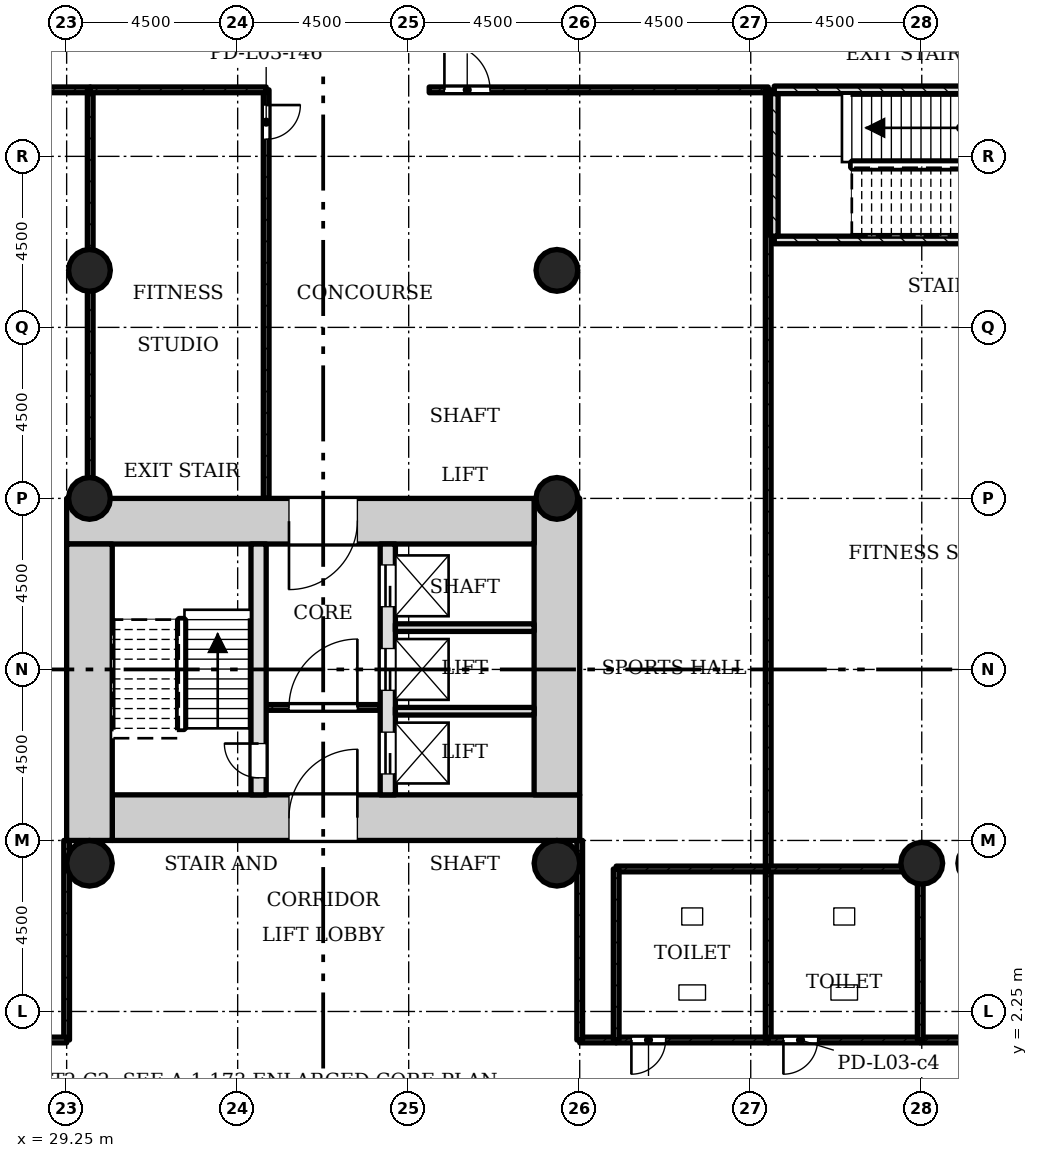
"""IFC4 building model, lengths in metres.
Left out: names, types, materials, properties, quantities, classifications, styles, units other than length and angle.
Written with IfcOpenShell. Run it as: python <this file> out.ifc"""

import sys

from ifc_helpers import new_model, si_unit, direction, frame, frame_2d, origin, origin_2d, place, context, subcontext, project, spatial, rectangle, hollow_circle, extrude, element, fill, save


model = new_model("IFC4")
c1 = context("Model", 3, precision=1e-05, world=origin(), true_north=direction((0.0, 1.0)))
c2 = subcontext(c1, "Body", "Model", "MODEL_VIEW")
j1 = project(units=[si_unit("LENGTHUNIT", "METRE"), si_unit("PLANEANGLEUNIT", "RADIAN")], contexts=[c1])
p1 = place(None, origin())
s1 = spatial("IfcSite", under=j1, at=p1, CompositionType="ELEMENT")
p2 = place(p1, origin())
s2 = spatial("IfcBuilding", under=s1, at=p2, CompositionType="ELEMENT")
p3 = place(p2, frame((0.0, 0.0, 15.5)))
s3 = spatial("IfcBuildingStorey", under=s2, at=p3, CompositionType="ELEMENT", Elevation=15.5)
p4 = place(p3, frame((30.45, 7.35, 0.0), z_axis=(0.0, 0.0, 1.0), x_axis=(1.0, 0.0, 0.0)))
e1 = element("IfcWall", 1, at=p4, inside=s3, PredefinedType="SHEAR", context=c2, shape_type="SweptSolid", body=[
    extrude(rectangle(XDim=12.3, YDim=1.2, at=frame_2d((6.15, 0.0))), origin(), (0.0, 0.0, 1.0), 4.5),
])
p5 = place(p4, frame((4.65, 0.0, 0.0)))
e2 = element("IfcOpeningElement", 2, at=p5, cuts=e1, PredefinedType="OPENING", context=c2, shape_type="SweptSolid", body=[
    extrude(rectangle(XDim=1.8, YDim=2.1, at=frame_2d((0.9, 1.05))), frame((0.0, 0.61, 0.0), z_axis=(0.0, -1.0, 0.0), x_axis=(1.0, 0.0, 0.0)), (0.0, 0.0, 1.0), 1.22),
])
p6 = place(p3, frame((42.15, 7.95, 0.0), z_axis=(0.0, 0.0, 1.0), x_axis=(0.0, 1.0, 0.0)))
e3 = element("IfcWall", 3, at=p6, inside=s3, PredefinedType="SHEAR", context=c2, shape_type="SweptSolid", body=[
    extrude(rectangle(XDim=7.8, YDim=1.2, at=frame_2d((3.9, 0.0))), origin(), (0.0, 0.0, 1.0), 4.5),
])
p7 = place(p3, frame((41.55, 15.15, 0.0), z_axis=(0.0, 0.0, 1.0), x_axis=(-1.0, 0.0, 0.0)))
e4 = element("IfcWall", 4, at=p7, inside=s3, PredefinedType="SHEAR", context=c2, shape_type="SweptSolid", body=[
    extrude(rectangle(XDim=12.3, YDim=1.2, at=frame_2d((6.15, 0.0))), origin(), (0.0, 0.0, 1.0), 4.5),
])
p8 = place(p7, frame((4.65, 0.0, 0.0)))
e5 = element("IfcOpeningElement", 5, at=p8, cuts=e4, PredefinedType="OPENING", context=c2, shape_type="SweptSolid", body=[
    extrude(rectangle(XDim=1.8, YDim=2.1, at=frame_2d((0.9, 1.05))), frame((0.0, 0.61, 0.0), z_axis=(0.0, -1.0, 0.0), x_axis=(1.0, 0.0, 0.0)), (0.0, 0.0, 1.0), 1.22),
])
p9 = place(p3, frame((29.85, 14.55, 0.0), z_axis=(0.0, 0.0, 1.0), x_axis=(0.0, -1.0, 0.0)))
e6 = element("IfcWall", 6, at=p9, inside=s3, PredefinedType="SHEAR", context=c2, shape_type="SweptSolid", body=[
    extrude(rectangle(XDim=7.8, YDim=1.2, at=frame_2d((3.9, 0.0))), origin(), (0.0, 0.0, 1.0), 4.5),
])
p10 = place(p3, frame((34.3, 7.95, 0.0), z_axis=(0.0, 0.0, 1.0), x_axis=(0.0, 1.0, 0.0)))
e7 = element("IfcWall", 7, at=p10, inside=s3, PredefinedType="SHEAR", context=c2, shape_type="SweptSolid", body=[
    extrude(rectangle(XDim=6.6, YDim=0.4, at=frame_2d((3.3, 0.0))), origin(), (0.0, 0.0, 1.0), 4.5),
])
p11 = place(p10, frame((0.45, 0.0, 0.0)))
e8 = element("IfcOpeningElement", 8, at=p11, cuts=e7, PredefinedType="OPENING", context=c2, shape_type="SweptSolid", body=[
    extrude(rectangle(XDim=0.9, YDim=2.1, at=frame_2d((0.45, 1.05))), frame((0.0, 0.21, 0.0), z_axis=(0.0, -1.0, 0.0), x_axis=(1.0, 0.0, 0.0)), (0.0, 0.0, 1.0), 0.42),
])
p12 = place(p3, frame((37.7, 7.95, 0.0), z_axis=(0.0, 0.0, 1.0), x_axis=(0.0, 1.0, 0.0)))
e9 = element("IfcWall", 9, at=p12, inside=s3, PredefinedType="SHEAR", context=c2, shape_type="SweptSolid", body=[
    extrude(rectangle(XDim=6.6, YDim=0.4, at=frame_2d((3.3, 0.0))), origin(), (0.0, 0.0, 1.0), 4.5),
])
p13 = place(p12, frame((0.55, 0.0, 0.0)))
e10 = element("IfcOpeningElement", 10, at=p13, cuts=e9, PredefinedType="OPENING", context=c2, shape_type="SweptSolid", body=[
    extrude(rectangle(XDim=1.1, YDim=2.1, at=frame_2d((0.55, 1.05))), frame((0.0, 0.21, 0.0), z_axis=(0.0, -1.0, 0.0), x_axis=(1.0, 0.0, 0.0)), (0.0, 0.0, 1.0), 0.42),
])
p14 = place(p12, frame((2.75, 0.0, 0.0)))
e11 = element("IfcOpeningElement", 11, at=p14, cuts=e9, PredefinedType="OPENING", context=c2, shape_type="SweptSolid", body=[
    extrude(rectangle(XDim=1.1, YDim=2.1, at=frame_2d((0.55, 1.05))), frame((0.0, 0.21, 0.0), z_axis=(0.0, -1.0, 0.0), x_axis=(1.0, 0.0, 0.0)), (0.0, 0.0, 1.0), 0.42),
])
p15 = place(p12, frame((4.95, 0.0, 0.0)))
e12 = element("IfcOpeningElement", 12, at=p15, cuts=e9, PredefinedType="OPENING", context=c2, shape_type="SweptSolid", body=[
    extrude(rectangle(XDim=1.1, YDim=2.1, at=frame_2d((0.55, 1.05))), frame((0.0, 0.21, 0.0), z_axis=(0.0, -1.0, 0.0), x_axis=(1.0, 0.0, 0.0)), (0.0, 0.0, 1.0), 0.42),
])
for number, where, z_axis, x_axis in (
    (13, (42.15, 15.75, 0.0), (0.0, 0.0, 1.0), (1.0, 0.0, 0.0)),
    (14, (29.85, 15.75, 0.0), (0.0, 0.0, 1.0), (1.0, 0.0, 0.0)),
    (15, (42.15, 21.75, 0.0), (0.0, 0.0, 1.0), (1.0, 0.0, 0.0)),
    (16, (29.85, 21.75, 0.0), (0.0, 0.0, 1.0), (1.0, 0.0, 0.0)),
    (17, (51.75, 6.15, 0.0), (0.0, 0.0, 1.0), (1.0, 0.0, 0.0)),
    (18, (53.25, 6.15, 0.0), (0.0, 0.0, 1.0), (1.0, 0.0, 0.0)),
):
    element("IfcColumn", number, at=place(p3, frame(where, z_axis=z_axis, x_axis=x_axis)), inside=s3, PredefinedType="COLUMN", context=c2, shape_type="SweptSolid", body=[
        extrude(hollow_circle(Radius=0.55, WallThickness=0.04, at=origin_2d()), origin(), (0.0, 0.0, 1.0), 4.5),
    ])
for number, where, z_axis, x_axis in (
    (19, (42.15, 6.15, 0.0), (0.0, 0.0, 1.0), (1.0, 0.0, 0.0)),
    (20, (29.85, 6.15, 0.0), (0.0, 0.0, 1.0), (1.0, 0.0, 0.0)),
):
    element("IfcColumn", number, at=place(p3, frame(where, z_axis=z_axis, x_axis=x_axis)), inside=s3, PredefinedType="COLUMN", context=c2, shape_type="SweptSolid", body=[
        extrude(hollow_circle(Radius=0.6, WallThickness=0.045, at=origin_2d()), origin(), (0.0, 0.0, 1.0), 4.5),
    ])
p16 = place(p3, frame((37.5, 10.25, 0.0), z_axis=(0.0, 0.0, 1.0), x_axis=(-1.0, 0.0, 0.0)))
e21 = element("IfcWall", 21, at=p16, inside=s3, PredefinedType="PARTITIONING", context=c2, shape_type="SweptSolid", body=[
    extrude(rectangle(XDim=3.0, YDim=0.15, at=frame_2d((1.5, 0.0))), origin(), (0.0, 0.0, 1.0), 4.08),
])
p17 = place(p16, frame((0.6, 0.0, 0.0)))
e22 = element("IfcOpeningElement", 22, at=p17, cuts=e21, PredefinedType="OPENING", context=c2, shape_type="SweptSolid", body=[
    extrude(rectangle(XDim=1.8, YDim=2.1, at=frame_2d((0.9, 1.05))), frame((0.0, 0.085, 0.0), z_axis=(0.0, -1.0, 0.0), x_axis=(1.0, 0.0, 0.0)), (0.0, 0.0, 1.0), 0.17),
])
for number, where, z_axis, x_axis in (
    (23, (41.55, 10.15, 0.0), (0.0, 0.0, 1.0), (-1.0, 0.0, 0.0)),
    (24, (41.55, 12.35, 0.0), (0.0, 0.0, 1.0), (-1.0, 0.0, 0.0)),
):
    element("IfcWall", number, at=place(p3, frame(where, z_axis=z_axis, x_axis=x_axis)), inside=s3, PredefinedType="SOLIDWALL", context=c2, shape_type="SweptSolid", body=[
        extrude(rectangle(XDim=3.65, YDim=0.2, at=frame_2d((1.825, 0.0))), origin(), (0.0, 0.0, 1.0), 4.08),
    ])
p18 = place(p3, frame((20.95, 26.5, 0.0), z_axis=(0.0, 0.0, 1.0), x_axis=(1.0, 0.0, 0.0)))
e25 = element("IfcWall", 25, at=p18, inside=s3, PredefinedType="PARTITIONING", context=c2, shape_type="SweptSolid", body=[
    extrude(rectangle(XDim=8.92, YDim=0.15, at=frame_2d((4.46, 0.0))), origin(), (0.0, 0.0, 1.0), 4.08),
])
p19 = place(p18, frame((0.4, 0.0, 0.0)))
e26 = element("IfcOpeningElement", 26, at=p19, cuts=e25, PredefinedType="OPENING", context=c2, shape_type="SweptSolid", body=[
    extrude(rectangle(XDim=1.2, YDim=2.1, at=frame_2d((0.6, 1.05))), frame((0.0, 0.085, 0.0), z_axis=(0.0, -1.0, 0.0), x_axis=(1.0, 0.0, 0.0)), (0.0, 0.0, 1.0), 0.17),
])
p20 = place(p3, frame((29.25, 6.75, 0.0), z_axis=(0.0, 0.0, 1.0), x_axis=(0.0, -1.0, 0.0)))
e27 = element("IfcWall", 27, at=p20, inside=s3, PredefinedType="PARTITIONING", context=c2, shape_type="SweptSolid", body=[
    extrude(rectangle(XDim=5.25, YDim=0.15, at=frame_2d((2.625, 0.0))), origin(), (0.0, 0.0, 1.0), 4.08),
])
p21 = place(p3, frame((29.25, 1.5, 0.0), z_axis=(0.0, 0.0, 1.0), x_axis=(-1.0, 0.0, 0.0)))
e28 = element("IfcWall", 28, at=p21, inside=s3, PredefinedType="PARTITIONING", context=c2, shape_type="SweptSolid", body=[
    extrude(rectangle(XDim=8.3, YDim=0.15, at=frame_2d((4.15, 0.0))), origin(), (0.0, 0.0, 1.0), 4.08),
])
p22 = place(p3, frame((29.87, 26.5, 0.0), z_axis=(0.0, 0.0, 1.0), x_axis=(0.0, -1.0, 0.0)))
e29 = element("IfcWall", 29, at=p22, inside=s3, PredefinedType="PARTITIONING", context=c2, shape_type="SweptSolid", body=[
    extrude(rectangle(XDim=10.75, YDim=0.15, at=frame_2d((5.375, 0.0))), origin(), (0.0, 0.0, 1.0), 4.08),
])
p23 = place(p3, frame((34.5, 26.5, 0.0), z_axis=(0.0, 0.0, 1.0), x_axis=(0.0, -1.0, 0.0)))
e30 = element("IfcWall", 30, at=p23, inside=s3, PredefinedType="PARTITIONING", context=c2, shape_type="SweptSolid", body=[
    extrude(rectangle(XDim=10.75, YDim=0.15, at=frame_2d((5.375, 0.0))), origin(), (0.0, 0.0, 1.0), 4.08),
])
p24 = place(p23, frame((0.4, 0.0, 0.0)))
e31 = element("IfcOpeningElement", 31, at=p24, cuts=e30, PredefinedType="OPENING", context=c2, shape_type="SweptSolid", body=[
    extrude(rectangle(XDim=0.9, YDim=2.1, at=frame_2d((0.45, 1.05))), frame((0.0, 0.085, 0.0), z_axis=(0.0, -1.0, 0.0), x_axis=(1.0, 0.0, 0.0)), (0.0, 0.0, 1.0), 0.17),
])
p25 = place(p3, frame((29.87, 26.5, 0.0), z_axis=(0.0, 0.0, 1.0), x_axis=(1.0, 0.0, 0.0)))
e32 = element("IfcWall", 32, at=p25, inside=s3, PredefinedType="PARTITIONING", context=c2, shape_type="SweptSolid", body=[
    extrude(rectangle(XDim=4.63, YDim=0.15, at=frame_2d((2.315, 0.0))), origin(), (0.0, 0.0, 1.0), 4.08),
])
p26 = place(p3, frame((43.71, 1.5, 0.0), z_axis=(0.0, 0.0, 1.0), x_axis=(-1.0, 0.0, 0.0)))
e33 = element("IfcWall", 33, at=p26, inside=s3, PredefinedType="PARTITIONING", context=c2, shape_type="SweptSolid", body=[
    extrude(rectangle(XDim=0.96, YDim=0.15, at=frame_2d((0.48, 0.0))), origin(), (0.0, 0.0, 1.0), 4.08),
])
p27 = place(p3, frame((42.75, 1.5, 0.0), z_axis=(0.0, 0.0, 1.0), x_axis=(0.0, 1.0, 0.0)))
e34 = element("IfcWall", 34, at=p27, inside=s3, PredefinedType="PARTITIONING", context=c2, shape_type="SweptSolid", body=[
    extrude(rectangle(XDim=5.25, YDim=0.15, at=frame_2d((2.625, 0.0))), origin(), (0.0, 0.0, 1.0), 4.08),
])
p28 = place(p3, frame((38.79, 26.5, 0.0), z_axis=(0.0, 0.0, 1.0), x_axis=(1.0, 0.0, 0.0)))
e35 = element("IfcWall", 35, at=p28, inside=s3, PredefinedType="PARTITIONING", context=c2, shape_type="SweptSolid", body=[
    extrude(rectangle(XDim=8.92, YDim=0.15, at=frame_2d((4.46, 0.0))), origin(), (0.0, 0.0, 1.0), 4.08),
])
p29 = place(p28, frame((0.4, 0.0, 0.0)))
e36 = element("IfcOpeningElement", 36, at=p29, cuts=e35, PredefinedType="OPENING", context=c2, shape_type="SweptSolid", body=[
    extrude(rectangle(XDim=1.2, YDim=2.1, at=frame_2d((0.6, 1.05))), frame((0.0, 0.085, 0.0), z_axis=(0.0, -1.0, 0.0), x_axis=(1.0, 0.0, 0.0)), (0.0, 0.0, 1.0), 0.17),
])
p30 = place(p3, frame((47.71, 26.5, 0.0), z_axis=(0.0, 0.0, 1.0), x_axis=(0.0, -1.0, 0.0)))
e37 = element("IfcWall", 37, at=p30, inside=s3, PredefinedType="PARTITIONING", context=c2, shape_type="SweptSolid", body=[
    extrude(rectangle(XDim=20.5, YDim=0.15, at=frame_2d((10.25, 0.0))), origin(), (0.0, 0.0, 1.0), 4.08),
])
p31 = place(p3, frame((56.63, 1.5, 0.0), z_axis=(0.0, 0.0, 1.0), x_axis=(-1.0, 0.0, 0.0)))
e38 = element("IfcWall", 38, at=p31, inside=s3, PredefinedType="PARTITIONING", context=c2, shape_type="SweptSolid", body=[
    extrude(rectangle(XDim=4.92, YDim=0.15, at=frame_2d((2.46, 0.0))), origin(), (0.0, 0.0, 1.0), 4.08),
])
p32 = place(p31, frame((0.4, 0.0, 0.0)))
e39 = element("IfcOpeningElement", 39, at=p32, cuts=e38, PredefinedType="OPENING", context=c2, shape_type="SweptSolid", body=[
    extrude(rectangle(XDim=1.2, YDim=2.1, at=frame_2d((0.6, 1.05))), frame((0.0, 0.085, 0.0), z_axis=(0.0, -1.0, 0.0), x_axis=(1.0, 0.0, 0.0)), (0.0, 0.0, 1.0), 0.17),
])
p33 = place(p3, frame((43.71, 1.5, 0.0), z_axis=(0.0, 0.0, 1.0), x_axis=(1.0, 0.0, 0.0)))
e40 = element("IfcWall", 40, at=p33, inside=s3, PredefinedType="PARTITIONING", context=c2, shape_type="SweptSolid", body=[
    extrude(rectangle(XDim=4.0, YDim=0.15, at=frame_2d((2.0, 0.0))), origin(), (0.0, 0.0, 1.0), 4.08),
])
p34 = place(p33, frame((0.4, 0.0, 0.0)))
e41 = element("IfcOpeningElement", 41, at=p34, cuts=e40, PredefinedType="OPENING", context=c2, shape_type="SweptSolid", body=[
    extrude(rectangle(XDim=0.9, YDim=2.1, at=frame_2d((0.45, 1.05))), frame((0.0, 0.085, 0.0), z_axis=(0.0, -1.0, 0.0), x_axis=(1.0, 0.0, 0.0)), (0.0, 0.0, 1.0), 0.17),
])
p35 = place(p3, frame((47.71, 6.0, 0.0), z_axis=(0.0, 0.0, 1.0), x_axis=(-1.0, 0.0, 0.0)))
e42 = element("IfcWall", 42, at=p35, inside=s3, PredefinedType="PARTITIONING", context=c2, shape_type="SweptSolid", body=[
    extrude(rectangle(XDim=4.0, YDim=0.15, at=frame_2d((2.0, 0.0))), origin(), (0.0, 0.0, 1.0), 4.08),
])
for number, where, z_axis, x_axis in (
    (43, (43.71, 6.0, 0.0), (0.0, 0.0, 1.0), (0.0, -1.0, 0.0)),
    (44, (47.71, 1.5, 0.0), (0.0, 0.0, 1.0), (0.0, 1.0, 0.0)),
):
    element("IfcWall", number, at=place(p3, frame(where, z_axis=z_axis, x_axis=x_axis)), inside=s3, PredefinedType="PARTITIONING", context=c2, shape_type="SweptSolid", body=[
        extrude(rectangle(XDim=4.5, YDim=0.15, at=frame_2d((2.25, 0.0))), origin(), (0.0, 0.0, 1.0), 4.08),
    ])
p36 = place(p3, frame((47.71, 1.5, 0.0), z_axis=(0.0, 0.0, 1.0), x_axis=(1.0, 0.0, 0.0)))
e45 = element("IfcWall", 45, at=p36, inside=s3, PredefinedType="PARTITIONING", context=c2, shape_type="SweptSolid", body=[
    extrude(rectangle(XDim=4.0, YDim=0.15, at=frame_2d((2.0, 0.0))), origin(), (0.0, 0.0, 1.0), 4.08),
])
p37 = place(p36, frame((0.4, 0.0, 0.0)))
e46 = element("IfcOpeningElement", 46, at=p37, cuts=e45, PredefinedType="OPENING", context=c2, shape_type="SweptSolid", body=[
    extrude(rectangle(XDim=0.9, YDim=2.1, at=frame_2d((0.45, 1.05))), frame((0.0, 0.085, 0.0), z_axis=(0.0, -1.0, 0.0), x_axis=(1.0, 0.0, 0.0)), (0.0, 0.0, 1.0), 0.17),
])
p38 = place(p3, frame((51.71, 1.5, 0.0), z_axis=(0.0, 0.0, 1.0), x_axis=(0.0, 1.0, 0.0)))
e47 = element("IfcWall", 47, at=p38, inside=s3, PredefinedType="PARTITIONING", context=c2, shape_type="SweptSolid", body=[
    extrude(rectangle(XDim=4.5, YDim=0.15, at=frame_2d((2.25, 0.0))), origin(), (0.0, 0.0, 1.0), 4.08),
])
p39 = place(p3, frame((51.71, 6.0, 0.0), z_axis=(0.0, 0.0, 1.0), x_axis=(-1.0, 0.0, 0.0)))
e48 = element("IfcWall", 48, at=p39, inside=s3, PredefinedType="PARTITIONING", context=c2, shape_type="SweptSolid", body=[
    extrude(rectangle(XDim=4.0, YDim=0.15, at=frame_2d((2.0, 0.0))), origin(), (0.0, 0.0, 1.0), 4.08),
])
p40 = place(p3, frame((47.87, 26.5, 0.0), z_axis=(0.0, 0.0, 1.0), x_axis=(1.0, 0.0, 0.0)))
e49 = element("IfcWall", 49, at=p40, inside=s3, PredefinedType="SHEAR", context=c2, shape_type="SweptSolid", body=[
    extrude(rectangle(XDim=6.8, YDim=0.2, at=frame_2d((3.4, 0.0))), origin(), (0.0, 0.0, 1.0), 4.08),
])
p41 = place(p40, frame((5.35, 0.0, 0.0)))
e50 = element("IfcOpeningElement", 50, at=p41, cuts=e49, PredefinedType="OPENING", context=c2, shape_type="SweptSolid", body=[
    extrude(rectangle(XDim=0.9, YDim=2.1, at=frame_2d((0.45, 1.05))), frame((0.0, 0.11, 0.0), z_axis=(0.0, -1.0, 0.0), x_axis=(1.0, 0.0, 0.0)), (0.0, 0.0, 1.0), 0.22),
])
p42 = place(p3, frame((47.87, 22.55, 0.0), z_axis=(0.0, 0.0, 1.0), x_axis=(1.0, 0.0, 0.0)))
e51 = element("IfcWall", 51, at=p42, inside=s3, PredefinedType="SHEAR", context=c2, shape_type="SweptSolid", body=[
    extrude(rectangle(XDim=6.8, YDim=0.2, at=frame_2d((3.4, 0.0))), origin(), (0.0, 0.0, 1.0), 4.08),
])
p43 = place(p3, frame((47.87, 22.65, 0.0), z_axis=(0.0, 0.0, 1.0), x_axis=(0.0, 1.0, 0.0)))
e52 = element("IfcWall", 52, at=p43, inside=s3, PredefinedType="SHEAR", context=c2, shape_type="SweptSolid", body=[
    extrude(rectangle(XDim=3.75, YDim=0.2, at=frame_2d((1.875, 0.0))), origin(), (0.0, 0.0, 1.0), 4.08),
])
p44 = place(p17, origin())
e53 = element("IfcDoor", 53, at=p44, inside=s3, OperationType="SINGLE_SWING_LEFT", PredefinedType="DOOR", context=c2, shape_type="SweptSolid", body=[
    extrude(rectangle(XDim=1.8, YDim=2.1, at=frame_2d((0.9, 1.05))), frame((0.0, 0.025, 0.0), z_axis=(0.0, -1.0, 0.0), x_axis=(1.0, 0.0, 0.0)), (0.0, 0.0, 1.0), 0.05),
])
fill(e22, e53)
p45 = place(p24, origin())
e54 = element("IfcDoor", 54, at=p45, inside=s3, OperationType="SINGLE_SWING_RIGHT", PredefinedType="DOOR", context=c2, shape_type="SweptSolid", body=[
    extrude(rectangle(XDim=0.9, YDim=2.1, at=frame_2d((0.45, 1.05))), frame((0.0, 0.025, 0.0), z_axis=(0.0, -1.0, 0.0), x_axis=(1.0, 0.0, 0.0)), (0.0, 0.0, 1.0), 0.05),
])
fill(e31, e54)
p46 = place(p29, origin())
e55 = element("IfcDoor", 55, at=p46, inside=s3, OperationType="SINGLE_SWING_RIGHT", PredefinedType="DOOR", context=c2, shape_type="SweptSolid", body=[
    extrude(rectangle(XDim=1.2, YDim=2.1, at=frame_2d((0.6, 1.05))), frame((0.0, 0.025, 0.0), z_axis=(0.0, -1.0, 0.0), x_axis=(1.0, 0.0, 0.0)), (0.0, 0.0, 1.0), 0.05),
])
fill(e36, e55)
p47 = place(p34, origin())
e56 = element("IfcDoor", 56, at=p47, inside=s3, OperationType="SINGLE_SWING_LEFT", PredefinedType="DOOR", context=c2, shape_type="SweptSolid", body=[
    extrude(rectangle(XDim=0.9, YDim=2.1, at=frame_2d((0.45, 1.05))), frame((0.0, 0.025, 0.0), z_axis=(0.0, -1.0, 0.0), x_axis=(1.0, 0.0, 0.0)), (0.0, 0.0, 1.0), 0.05),
])
fill(e41, e56)
p48 = place(p37, origin())
e57 = element("IfcDoor", 57, at=p48, inside=s3, OperationType="SINGLE_SWING_LEFT", PredefinedType="DOOR", context=c2, shape_type="SweptSolid", body=[
    extrude(rectangle(XDim=0.9, YDim=2.1, at=frame_2d((0.45, 1.05))), frame((0.0, 0.025, 0.0), z_axis=(0.0, -1.0, 0.0), x_axis=(1.0, 0.0, 0.0)), (0.0, 0.0, 1.0), 0.05),
])
fill(e46, e57)
p49 = place(p11, origin())
e58 = element("IfcDoor", 58, at=p49, inside=s3, OperationType="SINGLE_SWING_LEFT", PredefinedType="DOOR", context=c2, shape_type="SweptSolid", body=[
    extrude(rectangle(XDim=0.9, YDim=2.1, at=frame_2d((0.45, 1.05))), frame((0.0, 0.025, 0.0), z_axis=(0.0, -1.0, 0.0), x_axis=(1.0, 0.0, 0.0)), (0.0, 0.0, 1.0), 0.05),
])
fill(e8, e58)
p50 = place(p13, origin())
e59 = element("IfcDoor", 59, at=p50, inside=s3, OperationType="SLIDING_TO_LEFT", PredefinedType="DOOR", context=c2, shape_type="SweptSolid", body=[
    extrude(rectangle(XDim=1.1, YDim=2.1, at=frame_2d((0.55, 1.05))), frame((0.0, 0.025, 0.0), z_axis=(0.0, -1.0, 0.0), x_axis=(1.0, 0.0, 0.0)), (0.0, 0.0, 1.0), 0.05),
])
fill(e10, e59)
p51 = place(p14, origin())
e60 = element("IfcDoor", 60, at=p51, inside=s3, OperationType="SLIDING_TO_LEFT", PredefinedType="DOOR", context=c2, shape_type="SweptSolid", body=[
    extrude(rectangle(XDim=1.1, YDim=2.1, at=frame_2d((0.55, 1.05))), frame((0.0, 0.025, 0.0), z_axis=(0.0, -1.0, 0.0), x_axis=(1.0, 0.0, 0.0)), (0.0, 0.0, 1.0), 0.05),
])
fill(e11, e60)
p52 = place(p15, origin())
e61 = element("IfcDoor", 61, at=p52, inside=s3, OperationType="SLIDING_TO_LEFT", PredefinedType="DOOR", context=c2, shape_type="SweptSolid", body=[
    extrude(rectangle(XDim=1.1, YDim=2.1, at=frame_2d((0.55, 1.05))), frame((0.0, 0.025, 0.0), z_axis=(0.0, -1.0, 0.0), x_axis=(1.0, 0.0, 0.0)), (0.0, 0.0, 1.0), 0.05),
])
fill(e12, e61)
p53 = place(p5, origin())
e62 = element("IfcDoor", 62, at=p53, inside=s3, OperationType="SINGLE_SWING_LEFT", PredefinedType="DOOR", context=c2, shape_type="SweptSolid", body=[
    extrude(rectangle(XDim=1.8, YDim=2.1, at=frame_2d((0.9, 1.05))), frame((0.0, 0.025, 0.0), z_axis=(0.0, -1.0, 0.0), x_axis=(1.0, 0.0, 0.0)), (0.0, 0.0, 1.0), 0.05),
])
fill(e2, e62)
p54 = place(p8, origin())
e63 = element("IfcDoor", 63, at=p54, inside=s3, OperationType="SINGLE_SWING_LEFT", PredefinedType="DOOR", context=c2, shape_type="SweptSolid", body=[
    extrude(rectangle(XDim=1.8, YDim=2.1, at=frame_2d((0.9, 1.05))), frame((0.0, 0.025, 0.0), z_axis=(0.0, -1.0, 0.0), x_axis=(1.0, 0.0, 0.0)), (0.0, 0.0, 1.0), 0.05),
])
fill(e5, e63)
save(model, sys.argv[1])
